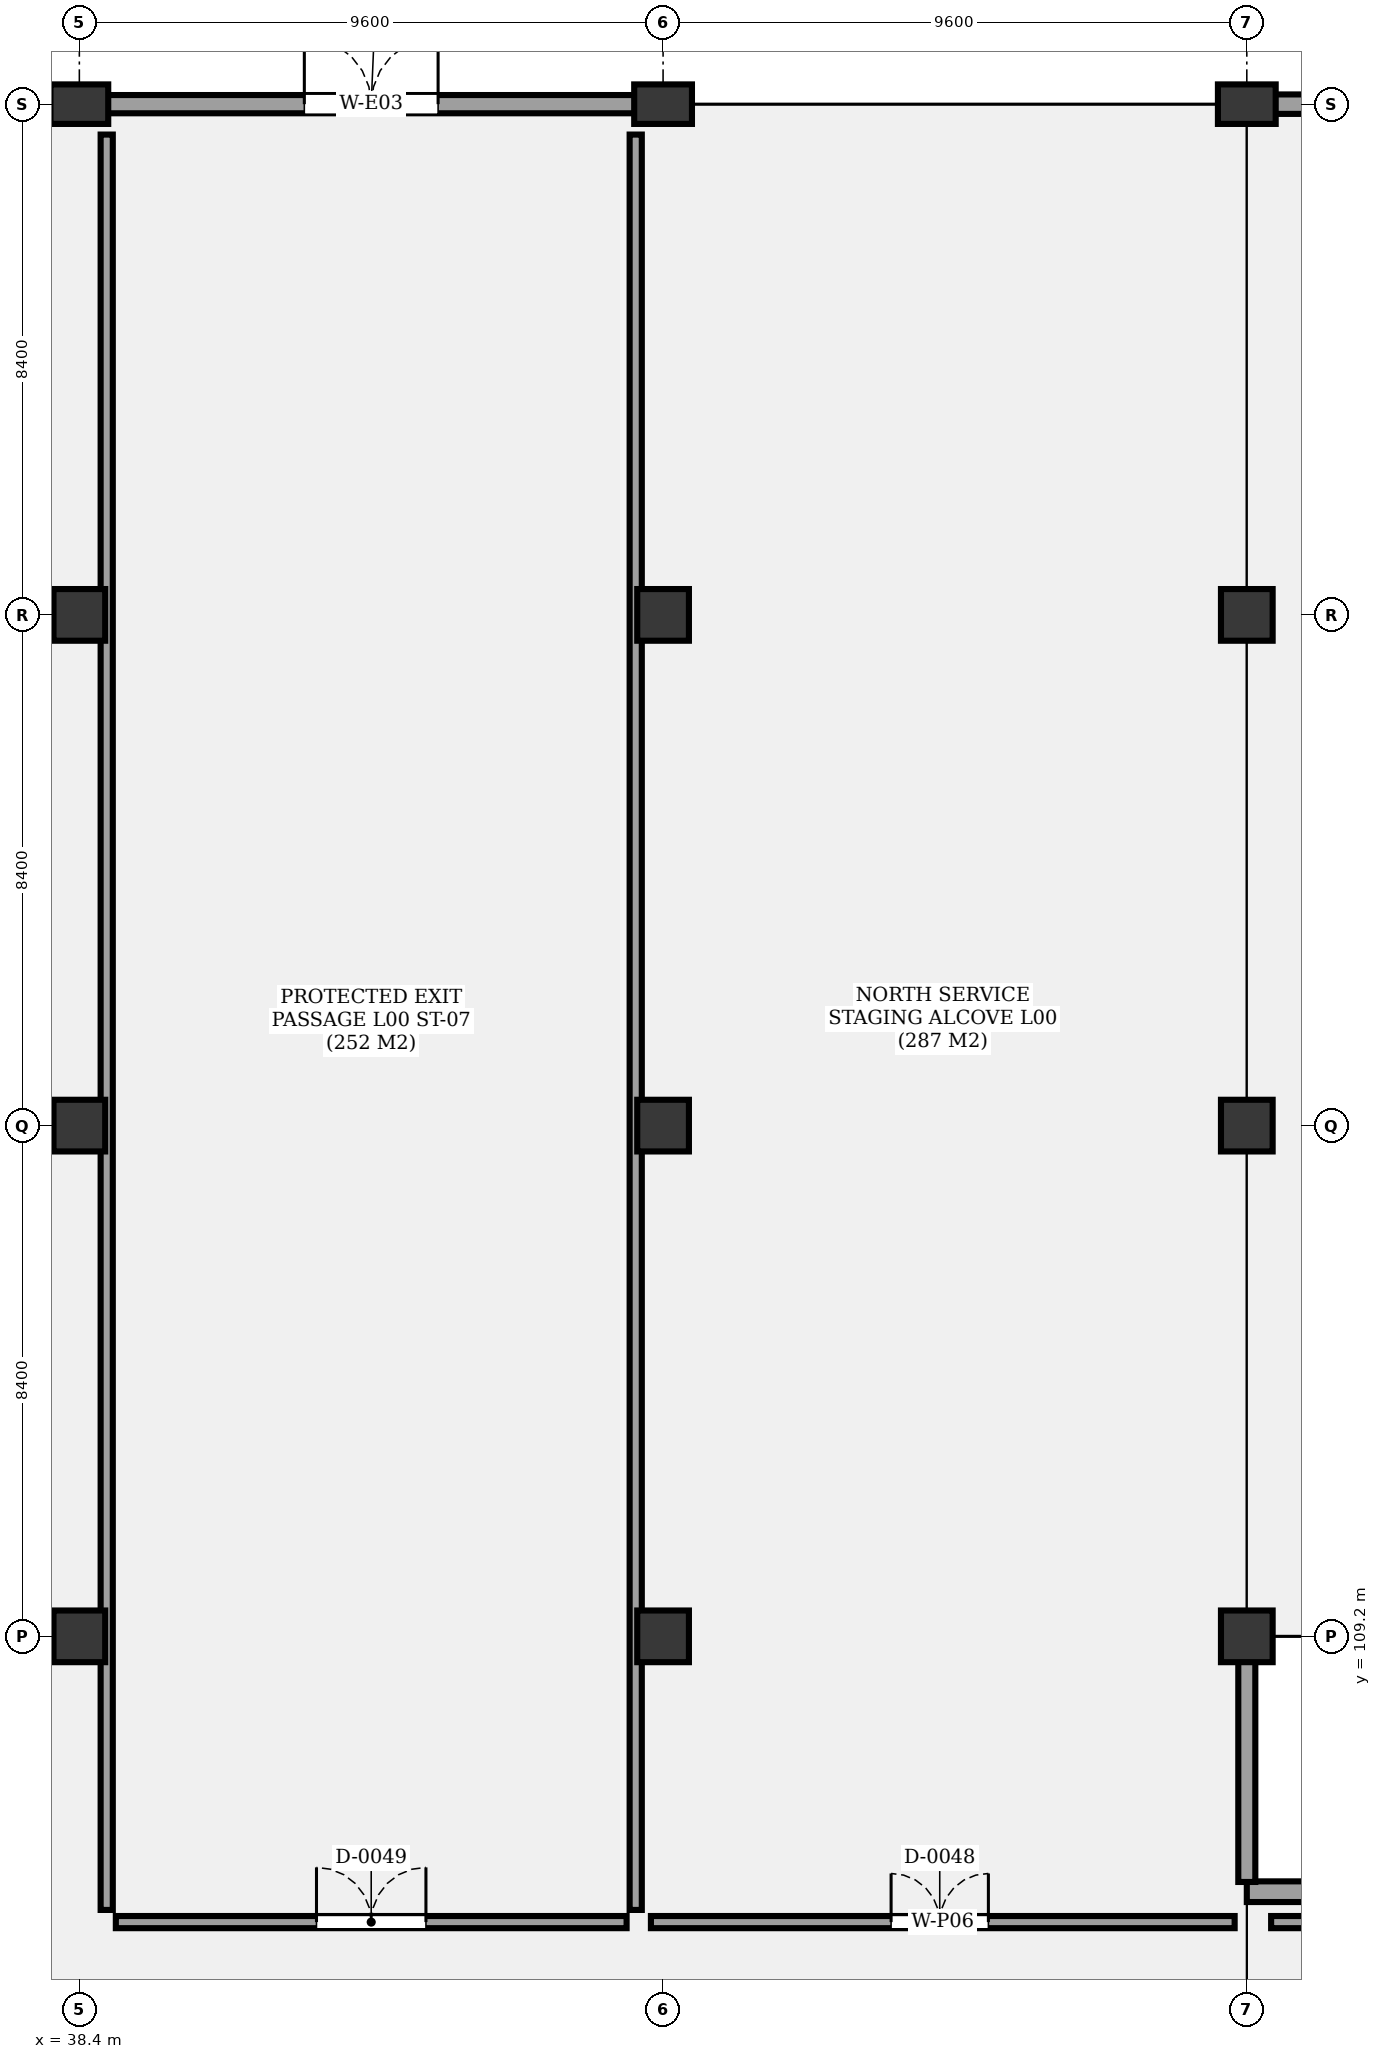
"""IFC4 building model, lengths in metres.
Left out: names, types, materials, properties, quantities, classifications, styles, units other than length and angle.
Written with IfcOpenShell. Run it as: python <this file> out.ifc"""

import sys

from ifc_helpers import new_model, si_unit, direction, frame, frame_2d, origin, origin_2d, place, context, subcontext, project, spatial, rectangle, extrude, element, fill, save


model = new_model("IFC4")
c1 = context("Model", 3, precision=1e-05, world=origin(), true_north=direction((0.0, 1.0)))
c2 = subcontext(c1, "Body", "Model", "MODEL_VIEW")
j1 = project(units=[si_unit("LENGTHUNIT", "METRE"), si_unit("PLANEANGLEUNIT", "RADIAN")], contexts=[c1])
p1 = place(None, origin())
s1 = spatial("IfcSite", under=j1, at=p1, CompositionType="ELEMENT")
p2 = place(p1, origin())
s2 = spatial("IfcBuilding", under=s1, at=p2, CompositionType="ELEMENT")
p3 = place(p2, origin())
s3 = spatial("IfcBuildingStorey", under=s2, at=p3, CompositionType="ELEMENT", Elevation=0.0)
for number, where, z_axis, x_axis in (
    (1, (38.4, 109.2, -0.35), (0.0, 0.0, 1.0), (1.0, 0.0, 0.0)),
    (2, (38.4, 117.6, -0.35), (0.0, 0.0, 1.0), (1.0, 0.0, 0.0)),
    (3, (38.4, 126.0, -0.35), (0.0, 0.0, 1.0), (1.0, 0.0, 0.0)),
):
    element("IfcColumn", number, at=place(p3, frame(where, z_axis=z_axis, x_axis=x_axis)), inside=s3, PredefinedType="COLUMN", context=c2, shape_type="SweptSolid", body=[
        extrude(rectangle(XDim=0.85, YDim=0.85, at=origin_2d()), origin(), (0.0, 0.0, 1.0), 5.45),
    ])
p4 = place(p3, frame((38.4, 134.4, -0.35), z_axis=(0.0, 0.0, 1.0), x_axis=(0.0, 1.0, 0.0)))
e4 = element("IfcColumn", 4, at=p4, inside=s3, PredefinedType="COLUMN", context=c2, shape_type="SweptSolid", body=[
    extrude(rectangle(XDim=0.95, YDim=0.65, at=origin_2d()), origin(), (0.0, 0.0, 1.0), 5.45),
])
for number, where, z_axis, x_axis in (
    (5, (48.0, 109.2, -0.35), (0.0, 0.0, 1.0), (1.0, 0.0, 0.0)),
    (6, (48.0, 117.6, -0.35), (0.0, 0.0, 1.0), (1.0, 0.0, 0.0)),
    (7, (48.0, 126.0, -0.35), (0.0, 0.0, 1.0), (1.0, 0.0, 0.0)),
):
    element("IfcColumn", number, at=place(p3, frame(where, z_axis=z_axis, x_axis=x_axis)), inside=s3, PredefinedType="COLUMN", context=c2, shape_type="SweptSolid", body=[
        extrude(rectangle(XDim=0.85, YDim=0.85, at=origin_2d()), origin(), (0.0, 0.0, 1.0), 5.45),
    ])
p5 = place(p3, frame((48.0, 134.4, -0.35), z_axis=(0.0, 0.0, 1.0), x_axis=(0.0, 1.0, 0.0)))
e8 = element("IfcColumn", 8, at=p5, inside=s3, PredefinedType="COLUMN", context=c2, shape_type="SweptSolid", body=[
    extrude(rectangle(XDim=0.95, YDim=0.65, at=origin_2d()), origin(), (0.0, 0.0, 1.0), 5.45),
])
for number, where, z_axis, x_axis in (
    (9, (57.6, 109.2, -0.35), (0.0, 0.0, 1.0), (1.0, 0.0, 0.0)),
    (10, (57.6, 117.6, -0.35), (0.0, 0.0, 1.0), (1.0, 0.0, 0.0)),
    (11, (57.6, 126.0, -0.35), (0.0, 0.0, 1.0), (1.0, 0.0, 0.0)),
):
    element("IfcColumn", number, at=place(p3, frame(where, z_axis=z_axis, x_axis=x_axis)), inside=s3, PredefinedType="COLUMN", context=c2, shape_type="SweptSolid", body=[
        extrude(rectangle(XDim=0.85, YDim=0.85, at=origin_2d()), origin(), (0.0, 0.0, 1.0), 5.45),
    ])
p6 = place(p3, frame((57.6, 134.4, -0.35), z_axis=(0.0, 0.0, 1.0), x_axis=(0.0, 1.0, 0.0)))
e12 = element("IfcColumn", 12, at=p6, inside=s3, PredefinedType="COLUMN", context=c2, shape_type="SweptSolid", body=[
    extrude(rectangle(XDim=0.95, YDim=0.65, at=origin_2d()), origin(), (0.0, 0.0, 1.0), 5.45),
])
p7 = place(p3, frame((57.6, 105.0, 0.0), z_axis=(0.0, 0.0, 1.0), x_axis=(1.0, 0.0, 0.0)))
e13 = element("IfcWall", 13, at=p7, inside=s3, PredefinedType="SOLIDWALL", context=c2, shape_type="SweptSolid", body=[
    extrude(rectangle(XDim=9.6, YDim=0.34, at=frame_2d((4.8, 0.0))), origin(), (0.0, 0.0, 1.0), 4.24),
])
p8 = place(p7, frame((3.3, 0.0, 0.85)))
e14 = element("IfcOpeningElement", 14, at=p8, cuts=e13, PredefinedType="OPENING", context=c2, shape_type="SweptSolid", body=[
    extrude(rectangle(XDim=3.0, YDim=1.4, at=frame_2d((1.5, 0.7))), frame((0.0, 0.18, 0.0), z_axis=(0.0, -1.0, 0.0), x_axis=(1.0, 0.0, 0.0)), (0.0, 0.0, 1.0), 0.36),
])
p9 = place(p3, frame((38.4, 134.4, 0.0), z_axis=(0.0, 0.0, 1.0), x_axis=(1.0, 0.0, 0.0)))
e15 = element("IfcWall", 15, at=p9, inside=s3, PredefinedType="SOLIDWALL", context=c2, shape_type="SweptSolid", body=[
    extrude(rectangle(XDim=9.6, YDim=0.3, at=frame_2d((4.8, 0.0))), origin(), (0.0, 0.0, 1.0), 4.24),
])
p10 = place(p9, frame((3.7, 0.0, 0.0)))
e16 = element("IfcOpeningElement", 16, at=p10, cuts=e15, PredefinedType="OPENING", context=c2, shape_type="SweptSolid", body=[
    extrude(rectangle(XDim=2.2, YDim=2.5, at=frame_2d((1.1, 1.25))), frame((0.0, 0.16, 0.0), z_axis=(0.0, -1.0, 0.0), x_axis=(1.0, 0.0, 0.0)), (0.0, 0.0, 1.0), 0.32),
])
p11 = place(p3, frame((57.6, 134.4, 0.0), z_axis=(0.0, 0.0, 1.0), x_axis=(1.0, 0.0, 0.0)))
e17 = element("IfcWall", 17, at=p11, inside=s3, PredefinedType="SOLIDWALL", context=c2, shape_type="SweptSolid", body=[
    extrude(rectangle(XDim=9.6, YDim=0.32, at=frame_2d((4.8, 0.0))), origin(), (0.0, 0.0, 1.0), 4.24),
])
p12 = place(p11, frame((2.7, 0.0, 0.0)))
e18 = element("IfcOpeningElement", 18, at=p12, cuts=e17, PredefinedType="OPENING", context=c2, shape_type="SweptSolid", body=[
    extrude(rectangle(XDim=4.2, YDim=3.0, at=frame_2d((2.1, 1.5))), frame((0.0, 0.17, 0.0), z_axis=(0.0, -1.0, 0.0), x_axis=(1.0, 0.0, 0.0)), (0.0, 0.0, 1.0), 0.34),
])
p13 = place(p3, frame((57.6, 109.04, 0.0), z_axis=(0.0, 0.0, 1.0), x_axis=(0.0, -1.0, 0.0)))
e19 = element("IfcWall", 19, at=p13, inside=s3, PredefinedType="SOLIDWALL", context=c2, shape_type="SweptSolid", body=[
    extrude(rectangle(XDim=3.88, YDim=0.28, at=frame_2d((1.94, 0.0))), origin(), (0.0, 0.0, 1.0), 4.24),
])
p14 = place(p3, frame((47.8, 104.5, 0.0), z_axis=(0.0, 0.0, 1.0), x_axis=(1.0, 0.0, 0.0)))
e20 = element("IfcWall", 20, at=p14, inside=s3, PredefinedType="PARTITIONING", context=c2, shape_type="SweptSolid", body=[
    extrude(rectangle(XDim=9.6, YDim=0.2, at=frame_2d((4.8, 0.0))), origin(), (0.0, 0.0, 1.0), 3.98),
])
p15 = place(p14, frame((3.95, 0.0, 0.0)))
e21 = element("IfcOpeningElement", 21, at=p15, cuts=e20, PredefinedType="OPENING", context=c2, shape_type="SweptSolid", body=[
    extrude(rectangle(XDim=1.6, YDim=2.2, at=frame_2d((0.8, 1.1))), frame((0.0, 0.11, 0.0), z_axis=(0.0, -1.0, 0.0), x_axis=(1.0, 0.0, 0.0)), (0.0, 0.0, 1.0), 0.22),
])
p16 = place(p3, frame((39.0, 104.5, 0.0), z_axis=(0.0, 0.0, 1.0), x_axis=(1.0, 0.0, 0.0)))
e22 = element("IfcWall", 22, at=p16, inside=s3, PredefinedType="PARTITIONING", context=c2, shape_type="SweptSolid", body=[
    extrude(rectangle(XDim=8.4, YDim=0.2, at=frame_2d((4.2, 0.0))), origin(), (0.0, 0.0, 1.0), 3.98),
])
p17 = place(p16, frame((3.3, 0.0, 0.0)))
e23 = element("IfcOpeningElement", 23, at=p17, cuts=e22, PredefinedType="OPENING", context=c2, shape_type="SweptSolid", body=[
    extrude(rectangle(XDim=1.8, YDim=2.2, at=frame_2d((0.9, 1.1))), frame((0.0, 0.11, 0.0), z_axis=(0.0, -1.0, 0.0), x_axis=(1.0, 0.0, 0.0)), (0.0, 0.0, 1.0), 0.22),
])
for number, where, z_axis, x_axis in (
    (24, (38.85, 104.7, 0.0), (0.0, 0.0, 1.0), (0.0, 1.0, 0.0)),
    (25, (47.55, 104.7, 0.0), (0.0, 0.0, 1.0), (0.0, 1.0, 0.0)),
):
    element("IfcWall", number, at=place(p3, frame(where, z_axis=z_axis, x_axis=x_axis)), inside=s3, PredefinedType="PARTITIONING", context=c2, shape_type="SweptSolid", body=[
        extrude(rectangle(XDim=29.2, YDim=0.2, at=frame_2d((14.6, 0.0))), origin(), (0.0, 0.0, 1.0), 3.98),
    ])
p18 = place(p3, frame((58.0, 104.5, 0.0), z_axis=(0.0, 0.0, 1.0), x_axis=(1.0, 0.0, 0.0)))
e26 = element("IfcWall", 26, at=p18, inside=s3, PredefinedType="PARTITIONING", context=c2, shape_type="SweptSolid", body=[
    extrude(rectangle(XDim=56.8, YDim=0.2, at=frame_2d((28.4, 0.0))), origin(), (0.0, 0.0, 1.0), 3.98),
])
p19 = place(p18, frame((13.65, 0.0, 0.0)))
e27 = element("IfcOpeningElement", 27, at=p19, cuts=e26, PredefinedType="OPENING", context=c2, shape_type="SweptSolid", body=[
    extrude(rectangle(XDim=1.8, YDim=2.2, at=frame_2d((0.9, 1.1))), frame((0.0, 0.11, 0.0), z_axis=(0.0, -1.0, 0.0), x_axis=(1.0, 0.0, 0.0)), (0.0, 0.0, 1.0), 0.22),
])
p20 = place(p18, frame((44.65, 0.0, 0.0)))
e28 = element("IfcOpeningElement", 28, at=p20, cuts=e26, PredefinedType="OPENING", context=c2, shape_type="SweptSolid", body=[
    extrude(rectangle(XDim=1.6, YDim=2.2, at=frame_2d((0.8, 1.1))), frame((0.0, 0.11, 0.0), z_axis=(0.0, -1.0, 0.0), x_axis=(1.0, 0.0, 0.0)), (0.0, 0.0, 1.0), 0.22),
])
p21 = place(p10, origin())
e29 = element("IfcDoor", 29, at=p21, inside=s3, OperationType="DOUBLE_DOOR_SINGLE_SWING", PredefinedType="DOOR", context=c2, shape_type="SweptSolid", body=[
    extrude(rectangle(XDim=2.2, YDim=2.5, at=frame_2d((1.1, 1.25))), frame((0.0, 0.025, 0.0), z_axis=(0.0, -1.0, 0.0), x_axis=(1.0, 0.0, 0.0)), (0.0, 0.0, 1.0), 0.05),
])
fill(e16, e29)
p22 = place(p15, origin())
e30 = element("IfcDoor", 30, at=p22, inside=s3, OperationType="DOUBLE_DOOR_SINGLE_SWING", PredefinedType="DOOR", context=c2, shape_type="SweptSolid", body=[
    extrude(rectangle(XDim=1.6, YDim=2.2, at=frame_2d((0.8, 1.1))), frame((0.0, 0.025, 0.0), z_axis=(0.0, -1.0, 0.0), x_axis=(1.0, 0.0, 0.0)), (0.0, 0.0, 1.0), 0.05),
])
fill(e21, e30)
p23 = place(p17, origin())
e31 = element("IfcDoor", 31, at=p23, inside=s3, OperationType="DOUBLE_DOOR_SINGLE_SWING", PredefinedType="DOOR", context=c2, shape_type="SweptSolid", body=[
    extrude(rectangle(XDim=1.8, YDim=2.2, at=frame_2d((0.9, 1.1))), frame((0.0, 0.025, 0.0), z_axis=(0.0, -1.0, 0.0), x_axis=(1.0, 0.0, 0.0)), (0.0, 0.0, 1.0), 0.05),
])
fill(e23, e31)
save(model, sys.argv[1])
